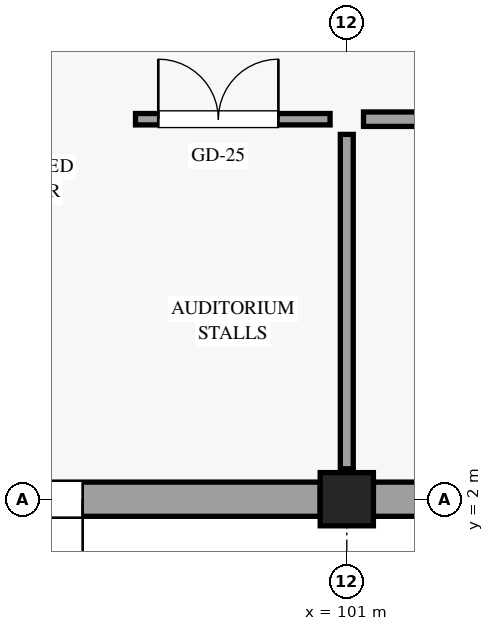
"""IFC4 building model, lengths in metres.
Left out: names, types, materials, properties, quantities, classifications, styles, units other than length and angle.
Written with IfcOpenShell. Run it as: python <this file> out.ifc"""

import sys

from ifc_helpers import new_model, si_unit, direction, frame, frame_2d, origin, origin_2d, place, context, subcontext, project, spatial, rectangle, extrude, element, fill, save


model = new_model("IFC4")
c1 = context("Model", 3, precision=1e-05, world=origin(), true_north=direction((0.0, 1.0)))
c2 = subcontext(c1, "Body", "Model", "MODEL_VIEW")
j1 = project(units=[si_unit("LENGTHUNIT", "METRE"), si_unit("PLANEANGLEUNIT", "RADIAN")], contexts=[c1])
p1 = place(None, origin())
s1 = spatial("IfcSite", under=j1, at=p1, CompositionType="ELEMENT")
p2 = place(p1, origin())
s2 = spatial("IfcBuilding", under=s1, at=p2, CompositionType="ELEMENT")
p3 = place(p2, origin())
s3 = spatial("IfcBuildingStorey", under=s2, at=p3, CompositionType="ELEMENT", Elevation=0.0)
p4 = place(p3, frame((101.0, 2.0, 0.0), z_axis=(0.0, 0.0, 1.0), x_axis=(1.0, 0.0, 0.0)))
e1 = element("IfcColumn", 1, at=p4, inside=s3, PredefinedType="COLUMN", context=c2, shape_type="SweptSolid", body=[
    extrude(rectangle(XDim=0.7, YDim=0.7, at=origin_2d()), origin(), (0.0, 0.0, 1.0), 5.4),
])
p5 = place(p3, frame((92.35, 2.0, 0.0), z_axis=(0.0, 0.0, 1.0), x_axis=(1.0, 0.0, 0.0)))
e2 = element("IfcWall", 2, at=p5, inside=s3, PredefinedType="STANDARD", context=c2, shape_type="SweptSolid", body=[
    extrude(rectangle(XDim=8.3, YDim=0.45, at=frame_2d((4.15, 0.0))), origin(), (0.0, 0.0, 1.0), 3.545),
])
p6 = place(p5, frame((5.175, 0.0, 0.0), z_axis=(0.0, 0.0, 1.0), x_axis=(-1.0, 0.0, 0.0)))
e3 = element("IfcOpeningElement", 3, at=p6, cuts=e2, PredefinedType="OPENING", context=c2, shape_type="SweptSolid", body=[
    extrude(rectangle(XDim=2.05, YDim=2.45, at=frame_2d((1.025, 1.225))), frame((0.0, 0.235, 0.0), z_axis=(0.0, -1.0, 0.0), x_axis=(1.0, 0.0, 0.0)), (0.0, 0.0, 1.0), 0.47),
])
p7 = place(p3, frame((101.35, 2.0, 0.0), z_axis=(0.0, 0.0, 1.0), x_axis=(1.0, 0.0, 0.0)))
e4 = element("IfcWall", 4, at=p7, inside=s3, PredefinedType="STANDARD", context=c2, shape_type="SweptSolid", body=[
    extrude(rectangle(XDim=8.3, YDim=0.45, at=frame_2d((4.15, 0.0))), origin(), (0.0, 0.0, 1.0), 3.545),
])
p8 = place(p7, frame((5.25, 0.0, 0.0), z_axis=(0.0, 0.0, 1.0), x_axis=(-1.0, 0.0, 0.0)))
e5 = element("IfcOpeningElement", 5, at=p8, cuts=e4, PredefinedType="OPENING", context=c2, shape_type="SweptSolid", body=[
    extrude(rectangle(XDim=2.2, YDim=2.5, at=frame_2d((1.1, 1.25))), frame((0.0, 0.235, 0.0), z_axis=(0.0, -1.0, 0.0), x_axis=(1.0, 0.0, 0.0)), (0.0, 0.0, 1.0), 0.47),
])
p9 = place(p3, frame((98.22, 7.0, 0.0), z_axis=(0.0, 0.0, 1.0), x_axis=(1.0, 0.0, 0.0)))
e6 = element("IfcWall", 6, at=p9, inside=s3, PredefinedType="PARTITIONING", context=c2, shape_type="SweptSolid", body=[
    extrude(rectangle(XDim=2.56, YDim=0.15, at=frame_2d((1.28, 0.0))), origin(), (0.0, 0.0, 1.0), 3.545),
])
p10 = place(p9, frame((0.3, 0.0, 0.0)))
e7 = element("IfcOpeningElement", 7, at=p10, cuts=e6, PredefinedType="OPENING", context=c2, shape_type="SweptSolid", body=[
    extrude(rectangle(XDim=1.58, YDim=2.38, at=frame_2d((0.79, 1.19))), frame((0.0, 0.085, 0.0), z_axis=(0.0, -1.0, 0.0), x_axis=(1.0, 0.0, 0.0)), (0.0, 0.0, 1.0), 0.17),
])
p11 = place(p3, frame((101.0, 2.4, 0.0), z_axis=(0.0, 0.0, 1.0), x_axis=(0.0, 1.0, 0.0)))
e8 = element("IfcWall", 8, at=p11, inside=s3, PredefinedType="PARTITIONING", context=c2, shape_type="SweptSolid", body=[
    extrude(rectangle(XDim=4.4, YDim=0.17, at=frame_2d((2.2, 0.0))), origin(), (0.0, 0.0, 1.0), 3.545),
])
p12 = place(p3, frame((101.22, 7.0, 0.0), z_axis=(0.0, 0.0, 1.0), x_axis=(1.0, 0.0, 0.0)))
e9 = element("IfcWall", 9, at=p12, inside=s3, PredefinedType="PARTITIONING", context=c2, shape_type="SweptSolid", body=[
    extrude(rectangle(XDim=8.56, YDim=0.19, at=frame_2d((4.28, 0.0))), origin(), (0.0, 0.0, 1.0), 3.545),
])
p13 = place(p12, frame((3.78, 0.0, 0.0)))
e10 = element("IfcOpeningElement", 10, at=p13, cuts=e9, PredefinedType="OPENING", context=c2, shape_type="SweptSolid", body=[
    extrude(rectangle(XDim=1.12, YDim=2.26, at=frame_2d((0.56, 1.13))), frame((0.0, 0.105, 0.0), z_axis=(0.0, -1.0, 0.0), x_axis=(1.0, 0.0, 0.0)), (0.0, 0.0, 1.0), 0.21),
])
p14 = place(p6, origin())
e11 = element("IfcDoor", 11, at=p14, inside=s3, OperationType="DOUBLE_DOOR_SINGLE_SWING", PredefinedType="DOOR", context=c2, shape_type="SweptSolid", body=[
    extrude(rectangle(XDim=2.05, YDim=2.45, at=frame_2d((1.025, 1.225))), frame((0.0, 0.025, 0.0), z_axis=(0.0, -1.0, 0.0), x_axis=(1.0, 0.0, 0.0)), (0.0, 0.0, 1.0), 0.05),
])
fill(e3, e11)
p15 = place(p10, origin())
e12 = element("IfcDoor", 12, at=p15, inside=s3, OperationType="DOUBLE_DOOR_SINGLE_SWING", PredefinedType="DOOR", context=c2, shape_type="SweptSolid", body=[
    extrude(rectangle(XDim=1.58, YDim=2.38, at=frame_2d((0.79, 1.19))), frame((0.0, 0.025, 0.0), z_axis=(0.0, -1.0, 0.0), x_axis=(1.0, 0.0, 0.0)), (0.0, 0.0, 1.0), 0.05),
])
fill(e7, e12)
save(model, sys.argv[1])
